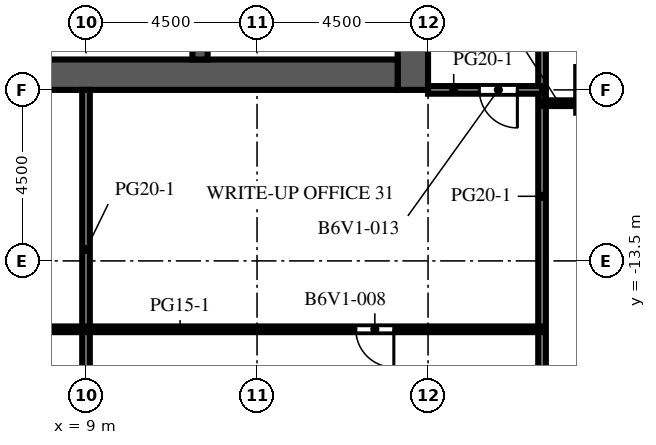
"""IFC4 building model, lengths in metres.
Left out: names, types, materials, properties, quantities, classifications, styles, units other than length and angle.
Written with IfcOpenShell. Run it as: python <this file> out.ifc"""

import sys

from ifc_helpers import new_model, si_unit, direction, frame, frame_2d, origin, place, context, subcontext, project, spatial, rectangle, extrude, element, fill, save


model = new_model("IFC4")
c1 = context("Model", 3, precision=1e-05, world=origin(), true_north=direction((0.0, 1.0)))
c2 = subcontext(c1, "Body", "Model", "MODEL_VIEW")
j1 = project(units=[si_unit("LENGTHUNIT", "METRE"), si_unit("PLANEANGLEUNIT", "RADIAN")], contexts=[c1])
p1 = place(None, origin())
s1 = spatial("IfcSite", under=j1, at=p1, CompositionType="ELEMENT")
p2 = place(p1, origin())
s2 = spatial("IfcBuilding", under=s1, at=p2, CompositionType="ELEMENT")
p3 = place(p2, frame((0.0, 0.0, 203.8)))
s3 = spatial("IfcBuildingStorey", under=s2, at=p3, CompositionType="ELEMENT", Elevation=203.8)
p4 = place(p3, frame((17.6, -9.0, 0.0), z_axis=(0.0, 0.0, 1.0), x_axis=(0.0, 1.0, 0.0)))
e1 = element("IfcWall", 1, at=p4, inside=s3, PredefinedType="SHEAR", context=c2, shape_type="SweptSolid", body=[
    extrude(rectangle(XDim=27.5, YDim=0.8, at=frame_2d((13.75, 0.0))), origin(), (0.0, 0.0, 1.0), 4.1),
])
p5 = place(p4, frame((12.55, 0.0, 0.0)))
e2 = element("IfcOpeningElement", 2, at=p5, cuts=e1, PredefinedType="OPENING", context=c2, shape_type="SweptSolid", body=[
    extrude(rectangle(XDim=2.4, YDim=2.4, at=frame_2d((1.2, 1.2))), frame((0.0, 0.41, 0.0), z_axis=(0.0, -1.0, 0.0), x_axis=(1.0, 0.0, 0.0)), (0.0, 0.0, 1.0), 0.82),
])
p6 = place(p4, frame((6.825, 0.0, 0.0)))
e3 = element("IfcOpeningElement", 3, at=p6, cuts=e1, PredefinedType="OPENING", context=c2, shape_type="SweptSolid", body=[
    extrude(rectangle(XDim=1.2, YDim=2.1, at=frame_2d((0.6, 1.05))), frame((0.0, 0.41, 0.0), z_axis=(0.0, -1.0, 0.0), x_axis=(1.0, 0.0, 0.0)), (0.0, 0.0, 1.0), 0.82),
])
p7 = place(p4, frame((19.475, 0.0, 0.0)))
e4 = element("IfcOpeningElement", 4, at=p7, cuts=e1, PredefinedType="OPENING", context=c2, shape_type="SweptSolid", body=[
    extrude(rectangle(XDim=1.2, YDim=2.1, at=frame_2d((0.6, 1.05))), frame((0.0, 0.41, 0.0), z_axis=(0.0, -1.0, 0.0), x_axis=(1.0, 0.0, 0.0)), (0.0, 0.0, 1.0), 0.82),
])
p8 = place(p3, frame((6.8, -8.6, 0.0), z_axis=(0.0, 0.0, 1.0), x_axis=(1.0, 0.0, 0.0)))
e5 = element("IfcWall", 5, at=p8, inside=s3, PredefinedType="SHEAR", context=c2, shape_type="SweptSolid", body=[
    extrude(rectangle(XDim=10.4, YDim=0.8, at=frame_2d((5.2, 0.0))), origin(), (0.0, 0.0, 1.0), 4.1),
])
p9 = place(p3, frame((12.0, -8.2, 0.0), z_axis=(0.0, 0.0, 1.0), x_axis=(0.0, 1.0, 0.0)))
e6 = element("IfcWall", 6, at=p9, inside=s3, PredefinedType="SHEAR", context=c2, shape_type="SweptSolid", body=[
    extrude(rectangle(XDim=7.5, YDim=0.4, at=frame_2d((3.75, 0.0))), origin(), (0.0, 0.0, 1.0), 4.1),
])
p10 = place(p3, frame((8.3, -8.2, 0.0), z_axis=(0.0, 0.0, 1.0), x_axis=(0.0, 1.0, 0.0)))
e7 = element("IfcWall", 7, at=p10, inside=s3, PredefinedType="PARTITIONING", context=c2, shape_type="SweptSolid", body=[
    extrude(rectangle(XDim=2.25, YDim=0.1, at=frame_2d((1.125, 0.0))), origin(), (0.0, 0.0, 1.0), 3.65),
])
p11 = place(p10, frame((0.625, 0.0, 0.0)))
e8 = element("IfcOpeningElement", 8, at=p11, cuts=e7, PredefinedType="OPENING", context=c2, shape_type="SweptSolid", body=[
    extrude(rectangle(XDim=1.0, YDim=2.1, at=frame_2d((0.5, 1.05))), frame((0.0, 0.06, 0.0), z_axis=(0.0, -1.0, 0.0), x_axis=(1.0, 0.0, 0.0)), (0.0, 0.0, 1.0), 0.12),
])
p12 = place(p3, frame((9.0, -17.4, 0.0), z_axis=(0.0, 0.0, 1.0), x_axis=(0.0, 1.0, 0.0)))
e9 = element("IfcWall", 9, at=p12, inside=s3, PredefinedType="PARTITIONING", context=c2, shape_type="SweptSolid", body=[
    extrude(rectangle(XDim=8.4, YDim=0.2, at=frame_2d((4.2, 0.0))), origin(), (0.0, 0.0, 1.0), 3.65),
])
p13 = place(p3, frame((21.0, -26.85, 0.0), z_axis=(0.0, 0.0, 1.0), x_axis=(0.0, 1.0, 0.0)))
e10 = element("IfcWall", 10, at=p13, inside=s3, PredefinedType="PARTITIONING", context=c2, shape_type="SweptSolid", body=[
    extrude(rectangle(XDim=30.1, YDim=0.2, at=frame_2d((15.05, 0.0))), origin(), (0.0, 0.0, 1.0), 3.65),
])
p14 = place(p3, frame((21.0, -15.3, 0.0), z_axis=(0.0, 0.0, 1.0), x_axis=(-1.0, 0.0, 0.0)))
e11 = element("IfcWall", 11, at=p14, inside=s3, PredefinedType="PARTITIONING", context=c2, shape_type="SweptSolid", body=[
    extrude(rectangle(XDim=34.5, YDim=0.15, at=frame_2d((17.25, 0.0))), origin(), (0.0, 0.0, 1.0), 3.65),
])
p15 = place(p14, frame((28.9, 0.0, 0.0)))
e12 = element("IfcOpeningElement", 12, at=p15, cuts=e11, PredefinedType="OPENING", context=c2, shape_type="SweptSolid", body=[
    extrude(rectangle(XDim=1.0, YDim=2.1, at=frame_2d((0.5, 1.05))), frame((0.0, 0.085, 0.0), z_axis=(0.0, -1.0, 0.0), x_axis=(1.0, 0.0, 0.0)), (0.0, 0.0, 1.0), 0.17),
])
p16 = place(p14, frame((19.4, 0.0, 0.0)))
e13 = element("IfcOpeningElement", 13, at=p16, cuts=e11, PredefinedType="OPENING", context=c2, shape_type="SweptSolid", body=[
    extrude(rectangle(XDim=1.0, YDim=2.1, at=frame_2d((0.5, 1.05))), frame((0.0, 0.085, 0.0), z_axis=(0.0, -1.0, 0.0), x_axis=(1.0, 0.0, 0.0)), (0.0, 0.0, 1.0), 0.17),
])
p17 = place(p14, frame((14.15, 0.0, 0.0)))
e14 = element("IfcOpeningElement", 14, at=p17, cuts=e11, PredefinedType="OPENING", context=c2, shape_type="SweptSolid", body=[
    extrude(rectangle(XDim=1.0, YDim=2.1, at=frame_2d((0.5, 1.05))), frame((0.0, 0.085, 0.0), z_axis=(0.0, -1.0, 0.0), x_axis=(1.0, 0.0, 0.0)), (0.0, 0.0, 1.0), 0.17),
])
p18 = place(p14, frame((3.9, 0.0, 0.0)))
e15 = element("IfcOpeningElement", 15, at=p18, cuts=e11, PredefinedType="OPENING", context=c2, shape_type="SweptSolid", body=[
    extrude(rectangle(XDim=1.0, YDim=2.1, at=frame_2d((0.5, 1.05))), frame((0.0, 0.085, 0.0), z_axis=(0.0, -1.0, 0.0), x_axis=(1.0, 0.0, 0.0)), (0.0, 0.0, 1.0), 0.17),
])
p19 = place(p3, frame((21.0, -9.35, 0.0), z_axis=(0.0, 0.0, 1.0), x_axis=(1.0, 0.0, 0.0)))
e16 = element("IfcWall", 16, at=p19, inside=s3, PredefinedType="PARTITIONING", context=c2, shape_type="SweptSolid", body=[
    extrude(rectangle(XDim=0.9, YDim=0.15, at=frame_2d((0.45, 0.0))), origin(), (0.0, 0.0, 1.0), 3.65),
])
p20 = place(p3, frame((21.0, -9.0, 0.0), z_axis=(0.0, 0.0, 1.0), x_axis=(-1.0, 0.0, 0.0)))
e17 = element("IfcWall", 17, at=p20, inside=s3, PredefinedType="PARTITIONING", context=c2, shape_type="SweptSolid", body=[
    extrude(rectangle(XDim=3.0, YDim=0.2, at=frame_2d((1.5, 0.0))), origin(), (0.0, 0.0, 1.0), 3.65),
])
p21 = place(p20, frame((0.65, 0.0, 0.0)))
e18 = element("IfcOpeningElement", 18, at=p21, cuts=e17, PredefinedType="OPENING", context=c2, shape_type="SweptSolid", body=[
    extrude(rectangle(XDim=1.0, YDim=2.1, at=frame_2d((0.5, 1.05))), frame((0.0, 0.11, 0.0), z_axis=(0.0, -1.0, 0.0), x_axis=(1.0, 0.0, 0.0)), (0.0, 0.0, 1.0), 0.22),
])
p22 = place(p18, origin())
e19 = element("IfcDoor", 19, at=p22, inside=s3, OperationType="SINGLE_SWING_LEFT", PredefinedType="DOOR", context=c2, shape_type="SweptSolid", body=[
    extrude(rectangle(XDim=1.0, YDim=2.1, at=frame_2d((0.5, 1.05))), frame((0.0, 0.025, 0.0), z_axis=(0.0, -1.0, 0.0), x_axis=(1.0, 0.0, 0.0)), (0.0, 0.0, 1.0), 0.05),
])
fill(e15, e19)
p23 = place(p21, origin())
e20 = element("IfcDoor", 20, at=p23, inside=s3, OperationType="SINGLE_SWING_LEFT", PredefinedType="DOOR", context=c2, shape_type="SweptSolid", body=[
    extrude(rectangle(XDim=1.0, YDim=2.1, at=frame_2d((0.5, 1.05))), frame((0.0, 0.025, 0.0), z_axis=(0.0, -1.0, 0.0), x_axis=(1.0, 0.0, 0.0)), (0.0, 0.0, 1.0), 0.05),
])
fill(e18, e20)
save(model, sys.argv[1])
